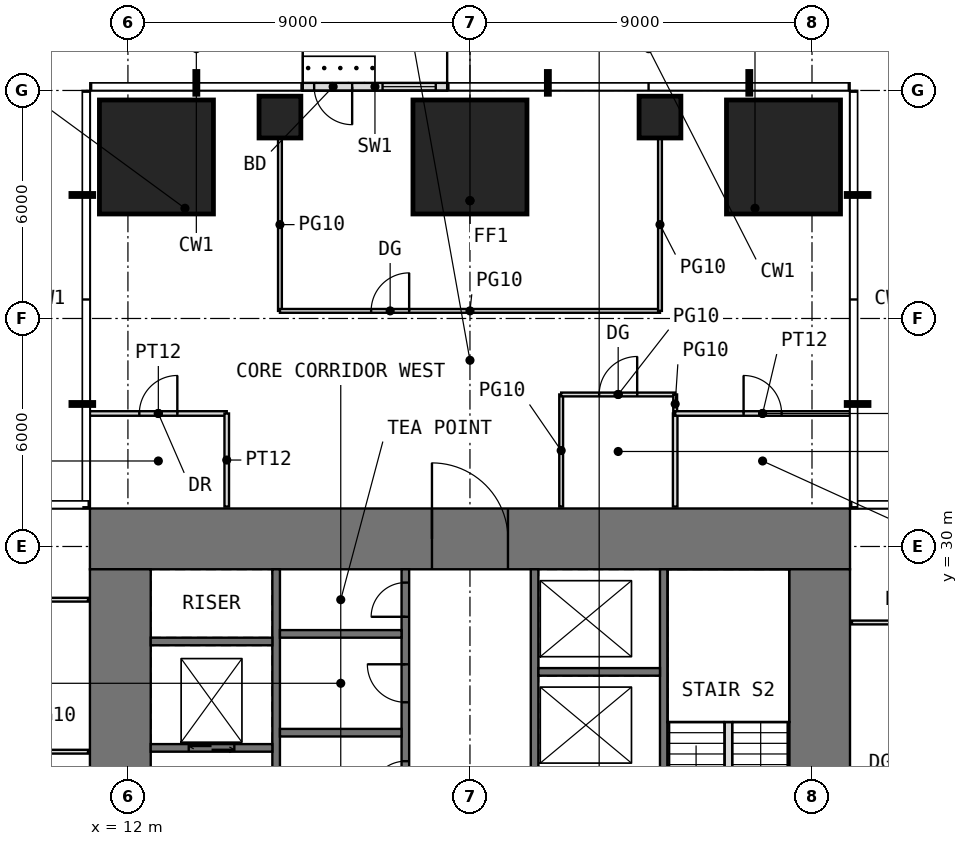
"""IFC4 building model, lengths in metres.
Left out: names, types, materials, properties, quantities, classifications, styles, units other than length and angle.
Written with IfcOpenShell. Run it as: python <this file> out.ifc"""

import sys

from ifc_helpers import new_model, si_unit, direction, frame, frame_2d, origin, origin_2d, place, context, subcontext, project, spatial, rectangle, extrude, element, fill, save


model = new_model("IFC4")
c1 = context("Model", 3, precision=1e-05, world=origin(), true_north=direction((0.0, 1.0)))
c2 = subcontext(c1, "Body", "Model", "MODEL_VIEW")
j1 = project(units=[si_unit("LENGTHUNIT", "METRE"), si_unit("PLANEANGLEUNIT", "RADIAN")], contexts=[c1])
p1 = place(None, origin())
s1 = spatial("IfcSite", under=j1, at=p1, CompositionType="ELEMENT")
p2 = place(p1, origin())
s2 = spatial("IfcBuilding", under=s1, at=p2, CompositionType="ELEMENT")
p3 = place(p2, frame((0.0, 0.0, 140.5)))
s3 = spatial("IfcBuildingStorey", under=s2, at=p3, CompositionType="ELEMENT", Elevation=140.5)
p4 = place(p3, frame((12.75, 40.25, 0.0), z_axis=(0.0, 0.0, 1.0), x_axis=(1.0, 0.0, 0.0)))
e1 = element("IfcColumn", 1, at=p4, inside=s3, PredefinedType="COLUMN", context=c2, shape_type="SweptSolid", body=[
    extrude(rectangle(XDim=3.0, YDim=3.0, at=origin_2d()), origin(), (0.0, 0.0, 1.0), 4.0),
])
p5 = place(p3, frame((16.0, 41.3, 0.0), z_axis=(0.0, 0.0, 1.0), x_axis=(1.0, 0.0, 0.0)))
e2 = element("IfcColumn", 2, at=p5, inside=s3, PredefinedType="COLUMN", context=c2, shape_type="SweptSolid", body=[
    extrude(rectangle(XDim=1.1, YDim=1.1, at=origin_2d()), origin(), (0.0, 0.0, 1.0), 4.0),
])
p6 = place(p3, frame((21.0, 40.25, 0.0), z_axis=(0.0, 0.0, 1.0), x_axis=(1.0, 0.0, 0.0)))
e3 = element("IfcColumn", 3, at=p6, inside=s3, PredefinedType="COLUMN", context=c2, shape_type="SweptSolid", body=[
    extrude(rectangle(XDim=3.0, YDim=3.0, at=origin_2d()), origin(), (0.0, 0.0, 1.0), 4.0),
])
p7 = place(p3, frame((26.0, 41.3, 0.0), z_axis=(0.0, 0.0, 1.0), x_axis=(1.0, 0.0, 0.0)))
e4 = element("IfcColumn", 4, at=p7, inside=s3, PredefinedType="COLUMN", context=c2, shape_type="SweptSolid", body=[
    extrude(rectangle(XDim=1.1, YDim=1.1, at=origin_2d()), origin(), (0.0, 0.0, 1.0), 4.0),
])
p8 = place(p3, frame((29.25, 40.25, 0.0), z_axis=(0.0, 0.0, 1.0), x_axis=(1.0, 0.0, 0.0)))
e5 = element("IfcColumn", 5, at=p8, inside=s3, PredefinedType="COLUMN", context=c2, shape_type="SweptSolid", body=[
    extrude(rectangle(XDim=3.0, YDim=3.0, at=origin_2d()), origin(), (0.0, 0.0, 1.0), 4.0),
])
p9 = place(p3, frame((20.4, 42.1, 0.0), z_axis=(0.0, 0.0, 1.0), x_axis=(-1.0, 0.0, 0.0)))
e6 = element("IfcWall", 6, at=p9, inside=s3, PredefinedType="USERDEFINED", context=c2, shape_type="SweptSolid", body=[
    extrude(rectangle(XDim=3.8, YDim=0.2, at=frame_2d((1.9, 0.0))), origin(), (0.0, 0.0, 1.0), 3.75),
])
p10 = place(p9, frame((2.5, 0.0, 0.0)))
e7 = element("IfcOpeningElement", 7, at=p10, cuts=e6, PredefinedType="OPENING", context=c2, shape_type="SweptSolid", body=[
    extrude(rectangle(XDim=1.0, YDim=2.4, at=frame_2d((0.5, 1.2))), frame((0.0, 0.11, 0.0), z_axis=(0.0, -1.0, 0.0), x_axis=(1.0, 0.0, 0.0)), (0.0, 0.0, 1.0), 0.22),
])
p11 = place(p9, frame((0.3, 0.0, 0.3)))
e8 = element("IfcOpeningElement", 8, at=p11, cuts=e6, PredefinedType="OPENING", context=c2, shape_type="SweptSolid", body=[
    extrude(rectangle(XDim=1.4, YDim=2.7, at=frame_2d((0.7, 1.35))), frame((0.0, 0.11, 0.0), z_axis=(0.0, -1.0, 0.0), x_axis=(1.0, 0.0, 0.0)), (0.0, 0.0, 1.0), 0.22),
])
p12 = place(p3, frame((11.0, 30.2, -0.05), z_axis=(0.0, 0.0, 1.0), x_axis=(1.0, 0.0, 0.0)))
e9 = element("IfcWall", 9, at=p12, inside=s3, PredefinedType="SHEAR", context=c2, shape_type="SweptSolid", body=[
    extrude(rectangle(XDim=20.0, YDim=1.6, at=frame_2d((10.0, 0.0))), origin(), (0.0, 0.0, 1.0), 4.0),
])
p13 = place(p12, frame((9.0, 0.0, 0.05)))
e10 = element("IfcOpeningElement", 10, at=p13, cuts=e9, PredefinedType="OPENING", context=c2, shape_type="SweptSolid", body=[
    extrude(rectangle(XDim=2.0, YDim=2.2, at=frame_2d((1.0, 1.1))), frame((0.0, 0.81, 0.0), z_axis=(0.0, -1.0, 0.0), x_axis=(1.0, 0.0, 0.0)), (0.0, 0.0, 1.0), 1.62),
])
p14 = place(p3, frame((11.8, 12.6, -0.05), z_axis=(0.0, 0.0, 1.0), x_axis=(0.0, 1.0, 0.0)))
e11 = element("IfcWall", 11, at=p14, inside=s3, PredefinedType="SHEAR", context=c2, shape_type="SweptSolid", body=[
    extrude(rectangle(XDim=16.8, YDim=1.6, at=frame_2d((8.4, 0.0))), origin(), (0.0, 0.0, 1.0), 4.0),
])
p15 = place(p14, frame((9.9, 0.0, 0.05)))
e12 = element("IfcOpeningElement", 12, at=p15, cuts=e11, PredefinedType="OPENING", context=c2, shape_type="SweptSolid", body=[
    extrude(rectangle(XDim=1.0, YDim=2.2, at=frame_2d((0.5, 1.1))), frame((0.0, 0.81, 0.0), z_axis=(0.0, -1.0, 0.0), x_axis=(1.0, 0.0, 0.0)), (0.0, 0.0, 1.0), 1.62),
])
p16 = place(p3, frame((30.2, 12.6, -0.05), z_axis=(0.0, 0.0, 1.0), x_axis=(0.0, 1.0, 0.0)))
e13 = element("IfcWall", 13, at=p16, inside=s3, PredefinedType="SHEAR", context=c2, shape_type="SweptSolid", body=[
    extrude(rectangle(XDim=16.8, YDim=1.6, at=frame_2d((8.4, 0.0))), origin(), (0.0, 0.0, 1.0), 4.0),
])
p17 = place(p16, frame((5.9, 0.0, 0.05)))
e14 = element("IfcOpeningElement", 14, at=p17, cuts=e13, PredefinedType="OPENING", context=c2, shape_type="SweptSolid", body=[
    extrude(rectangle(XDim=1.0, YDim=2.2, at=frame_2d((0.5, 1.1))), frame((0.0, 0.81, 0.0), z_axis=(0.0, -1.0, 0.0), x_axis=(1.0, 0.0, 0.0)), (0.0, 0.0, 1.0), 1.62),
])
p18 = place(p3, frame((15.9, 12.6, -0.05), z_axis=(0.0, 0.0, 1.0), x_axis=(0.0, 1.0, 0.0)))
e15 = element("IfcWall", 15, at=p18, inside=s3, PredefinedType="SHEAR", context=c2, shape_type="SweptSolid", body=[
    extrude(rectangle(XDim=16.8, YDim=0.2, at=frame_2d((8.4, 0.0))), origin(), (0.0, 0.0, 1.0), 4.0),
])
p19 = place(p18, frame((8.9, 0.0, 0.05)))
e16 = element("IfcOpeningElement", 16, at=p19, cuts=e15, PredefinedType="OPENING", context=c2, shape_type="SweptSolid", body=[
    extrude(rectangle(XDim=1.0, YDim=2.2, at=frame_2d((0.5, 1.1))), frame((0.0, 0.11, 0.0), z_axis=(0.0, -1.0, 0.0), x_axis=(1.0, 0.0, 0.0)), (0.0, 0.0, 1.0), 0.22),
])
p20 = place(p3, frame((19.3, 12.6, -0.05), z_axis=(0.0, 0.0, 1.0), x_axis=(0.0, 1.0, 0.0)))
e17 = element("IfcWall", 17, at=p20, inside=s3, PredefinedType="SHEAR", context=c2, shape_type="SweptSolid", body=[
    extrude(rectangle(XDim=16.8, YDim=0.2, at=frame_2d((8.4, 0.0))), origin(), (0.0, 0.0, 1.0), 4.0),
])
p21 = place(p20, frame((8.7, 0.0, 0.05)))
e18 = element("IfcOpeningElement", 18, at=p21, cuts=e17, PredefinedType="OPENING", context=c2, shape_type="SweptSolid", body=[
    extrude(rectangle(XDim=1.0, YDim=2.2, at=frame_2d((0.5, 1.1))), frame((0.0, 0.11, 0.0), z_axis=(0.0, -1.0, 0.0), x_axis=(1.0, 0.0, 0.0)), (0.0, 0.0, 1.0), 0.22),
])
p22 = place(p20, frame((10.85, 0.0, 0.05)))
e19 = element("IfcOpeningElement", 19, at=p22, cuts=e17, PredefinedType="OPENING", context=c2, shape_type="SweptSolid", body=[
    extrude(rectangle(XDim=0.9, YDim=2.2, at=frame_2d((0.45, 1.1))), frame((0.0, 0.11, 0.0), z_axis=(0.0, -1.0, 0.0), x_axis=(1.0, 0.0, 0.0)), (0.0, 0.0, 1.0), 0.22),
])
p23 = place(p20, frame((13.3, 0.0, 0.05)))
e20 = element("IfcOpeningElement", 20, at=p23, cuts=e17, PredefinedType="OPENING", context=c2, shape_type="SweptSolid", body=[
    extrude(rectangle(XDim=1.0, YDim=2.2, at=frame_2d((0.5, 1.1))), frame((0.0, 0.11, 0.0), z_axis=(0.0, -1.0, 0.0), x_axis=(1.0, 0.0, 0.0)), (0.0, 0.0, 1.0), 0.22),
])
p24 = place(p20, frame((15.55, 0.0, 0.05)))
e21 = element("IfcOpeningElement", 21, at=p24, cuts=e17, PredefinedType="OPENING", context=c2, shape_type="SweptSolid", body=[
    extrude(rectangle(XDim=0.9, YDim=2.2, at=frame_2d((0.45, 1.1))), frame((0.0, 0.11, 0.0), z_axis=(0.0, -1.0, 0.0), x_axis=(1.0, 0.0, 0.0)), (0.0, 0.0, 1.0), 0.22),
])
p25 = place(p20, frame((0.75, 0.0, 0.05)))
e22 = element("IfcOpeningElement", 22, at=p25, cuts=e17, PredefinedType="OPENING", context=c2, shape_type="SweptSolid", body=[
    extrude(rectangle(XDim=1.1, YDim=2.2, at=frame_2d((0.55, 1.1))), frame((0.0, 0.11, 0.0), z_axis=(0.0, -1.0, 0.0), x_axis=(1.0, 0.0, 0.0)), (0.0, 0.0, 1.0), 0.22),
])
p26 = place(p20, frame((3.55, 0.0, 0.05)))
e23 = element("IfcOpeningElement", 23, at=p26, cuts=e17, PredefinedType="OPENING", context=c2, shape_type="SweptSolid", body=[
    extrude(rectangle(XDim=1.1, YDim=2.2, at=frame_2d((0.55, 1.1))), frame((0.0, 0.11, 0.0), z_axis=(0.0, -1.0, 0.0), x_axis=(1.0, 0.0, 0.0)), (0.0, 0.0, 1.0), 0.22),
])
p27 = place(p20, frame((6.35, 0.0, 0.05)))
e24 = element("IfcOpeningElement", 24, at=p27, cuts=e17, PredefinedType="OPENING", context=c2, shape_type="SweptSolid", body=[
    extrude(rectangle(XDim=1.1, YDim=2.2, at=frame_2d((0.55, 1.1))), frame((0.0, 0.11, 0.0), z_axis=(0.0, -1.0, 0.0), x_axis=(1.0, 0.0, 0.0)), (0.0, 0.0, 1.0), 0.22),
])
p28 = place(p3, frame((22.7, 12.6, -0.05), z_axis=(0.0, 0.0, 1.0), x_axis=(0.0, 1.0, 0.0)))
e25 = element("IfcWall", 25, at=p28, inside=s3, PredefinedType="SHEAR", context=c2, shape_type="SweptSolid", body=[
    extrude(rectangle(XDim=16.8, YDim=0.2, at=frame_2d((8.4, 0.0))), origin(), (0.0, 0.0, 1.0), 4.0),
])
p29 = place(p28, frame((7.1, 0.0, 0.05)))
e26 = element("IfcOpeningElement", 26, at=p29, cuts=e25, PredefinedType="OPENING", context=c2, shape_type="SweptSolid", body=[
    extrude(rectangle(XDim=1.0, YDim=2.2, at=frame_2d((0.5, 1.1))), frame((0.0, 0.11, 0.0), z_axis=(0.0, -1.0, 0.0), x_axis=(1.0, 0.0, 0.0)), (0.0, 0.0, 1.0), 0.22),
])
p30 = place(p28, frame((1.55, 0.0, 0.05)))
e27 = element("IfcOpeningElement", 27, at=p30, cuts=e25, PredefinedType="OPENING", context=c2, shape_type="SweptSolid", body=[
    extrude(rectangle(XDim=0.9, YDim=2.2, at=frame_2d((0.45, 1.1))), frame((0.0, 0.11, 0.0), z_axis=(0.0, -1.0, 0.0), x_axis=(1.0, 0.0, 0.0)), (0.0, 0.0, 1.0), 0.22),
])
p31 = place(p28, frame((4.95, 0.0, 0.05)))
e28 = element("IfcOpeningElement", 28, at=p31, cuts=e25, PredefinedType="OPENING", context=c2, shape_type="SweptSolid", body=[
    extrude(rectangle(XDim=0.9, YDim=2.2, at=frame_2d((0.45, 1.1))), frame((0.0, 0.11, 0.0), z_axis=(0.0, -1.0, 0.0), x_axis=(1.0, 0.0, 0.0)), (0.0, 0.0, 1.0), 0.22),
])
p32 = place(p28, frame((9.4, 0.0, 0.05)))
e29 = element("IfcOpeningElement", 29, at=p32, cuts=e25, PredefinedType="OPENING", context=c2, shape_type="SweptSolid", body=[
    extrude(rectangle(XDim=1.0, YDim=2.2, at=frame_2d((0.5, 1.1))), frame((0.0, 0.11, 0.0), z_axis=(0.0, -1.0, 0.0), x_axis=(1.0, 0.0, 0.0)), (0.0, 0.0, 1.0), 0.22),
])
p33 = place(p3, frame((26.1, 12.6, -0.05), z_axis=(0.0, 0.0, 1.0), x_axis=(0.0, 1.0, 0.0)))
e30 = element("IfcWall", 30, at=p33, inside=s3, PredefinedType="SHEAR", context=c2, shape_type="SweptSolid", body=[
    extrude(rectangle(XDim=16.8, YDim=0.2, at=frame_2d((8.4, 0.0))), origin(), (0.0, 0.0, 1.0), 4.0),
])
p34 = place(p33, frame((6.9, 0.0, 0.05)))
e31 = element("IfcOpeningElement", 31, at=p34, cuts=e30, PredefinedType="OPENING", context=c2, shape_type="SweptSolid", body=[
    extrude(rectangle(XDim=1.0, YDim=2.2, at=frame_2d((0.5, 1.1))), frame((0.0, 0.11, 0.0), z_axis=(0.0, -1.0, 0.0), x_axis=(1.0, 0.0, 0.0)), (0.0, 0.0, 1.0), 0.22),
])
p35 = place(p3, frame((12.6, 24.7, -0.05), z_axis=(0.0, 0.0, 1.0), x_axis=(1.0, 0.0, 0.0)))
e32 = element("IfcWall", 32, at=p35, inside=s3, PredefinedType="SHEAR", context=c2, shape_type="SweptSolid", body=[
    extrude(rectangle(XDim=3.2, YDim=0.2, at=frame_2d((1.6, 0.0))), origin(), (0.0, 0.0, 1.0), 4.0),
])
p36 = place(p35, frame((1.0, 0.0, 0.05)))
e33 = element("IfcOpeningElement", 33, at=p36, cuts=e32, PredefinedType="OPENING", context=c2, shape_type="SweptSolid", body=[
    extrude(rectangle(XDim=1.2, YDim=2.2, at=frame_2d((0.6, 1.1))), frame((0.0, 0.11, 0.0), z_axis=(0.0, -1.0, 0.0), x_axis=(1.0, 0.0, 0.0)), (0.0, 0.0, 1.0), 0.22),
])
for number, where, z_axis, x_axis in (
    (34, (12.6, 27.5, -0.05), (0.0, 0.0, 1.0), (1.0, 0.0, 0.0)),
    (35, (16.0, 25.1, -0.05), (0.0, 0.0, 1.0), (1.0, 0.0, 0.0)),
    (36, (16.0, 27.7, -0.05), (0.0, 0.0, 1.0), (1.0, 0.0, 0.0)),
    (37, (22.8, 26.7, -0.05), (0.0, 0.0, 1.0), (1.0, 0.0, 0.0)),
):
    element("IfcWall", number, at=place(p3, frame(where, z_axis=z_axis, x_axis=x_axis)), inside=s3, PredefinedType="SHEAR", context=c2, shape_type="SweptSolid", body=[
        extrude(rectangle(XDim=3.2, YDim=0.2, at=frame_2d((1.6, 0.0))), origin(), (0.0, 0.0, 1.0), 4.0),
    ])
for number, where, z_axis, x_axis in (
    (38, (8.0, 24.6, 0.0), (0.0, 0.0, 1.0), (1.0, 0.0, 0.0)),
    (39, (8.0, 28.6, 0.0), (0.0, 0.0, 1.0), (1.0, 0.0, 0.0)),
):
    element("IfcWall", number, at=place(p3, frame(where, z_axis=z_axis, x_axis=x_axis)), inside=s3, PredefinedType="PARTITIONING", context=c2, shape_type="SweptSolid", body=[
        extrude(rectangle(XDim=2.95, YDim=0.1, at=frame_2d((1.475, 0.0))), origin(), (0.0, 0.0, 1.0), 3.75),
    ])
p37 = place(p3, frame((11.0, 33.5, 0.0), z_axis=(0.0, 0.0, 1.0), x_axis=(1.0, 0.0, 0.0)))
e40 = element("IfcWall", 40, at=p37, inside=s3, PredefinedType="PARTITIONING", context=c2, shape_type="SweptSolid", body=[
    extrude(rectangle(XDim=3.6, YDim=0.12, at=frame_2d((1.8, 0.0))), origin(), (0.0, 0.0, 1.0), 3.75),
])
p38 = place(p37, frame((1.3, 0.0, 0.0)))
e41 = element("IfcOpeningElement", 41, at=p38, cuts=e40, PredefinedType="OPENING", context=c2, shape_type="SweptSolid", body=[
    extrude(rectangle(XDim=1.0, YDim=2.2, at=frame_2d((0.5, 1.1))), frame((0.0, 0.07, 0.0), z_axis=(0.0, -1.0, 0.0), x_axis=(1.0, 0.0, 0.0)), (0.0, 0.0, 1.0), 0.14),
])
p39 = place(p3, frame((14.6, 31.05, 0.0), z_axis=(0.0, 0.0, 1.0), x_axis=(0.0, 1.0, 0.0)))
e42 = element("IfcWall", 42, at=p39, inside=s3, PredefinedType="PARTITIONING", context=c2, shape_type="SweptSolid", body=[
    extrude(rectangle(XDim=2.45, YDim=0.12, at=frame_2d((1.225, 0.0))), origin(), (0.0, 0.0, 1.0), 3.75),
])
p40 = place(p3, frame((16.0, 36.2, 0.0), z_axis=(0.0, 0.0, 1.0), x_axis=(0.0, 1.0, 0.0)))
e43 = element("IfcWall", 43, at=p40, inside=s3, PredefinedType="PARTITIONING", context=c2, shape_type="SweptSolid", body=[
    extrude(rectangle(XDim=4.54, YDim=0.1, at=frame_2d((2.27, 0.0))), origin(), (0.0, 0.0, 1.0), 3.75),
])
p41 = place(p3, frame((16.0, 36.2, 0.0), z_axis=(0.0, 0.0, 1.0), x_axis=(1.0, 0.0, 0.0)))
e44 = element("IfcWall", 44, at=p41, inside=s3, PredefinedType="PARTITIONING", context=c2, shape_type="SweptSolid", body=[
    extrude(rectangle(XDim=10.0, YDim=0.1, at=frame_2d((5.0, 0.0))), origin(), (0.0, 0.0, 1.0), 3.75),
])
p42 = place(p41, frame((2.4, 0.0, 0.0)))
e45 = element("IfcOpeningElement", 45, at=p42, cuts=e44, PredefinedType="OPENING", context=c2, shape_type="SweptSolid", body=[
    extrude(rectangle(XDim=1.0, YDim=2.4, at=frame_2d((0.5, 1.2))), frame((0.0, 0.06, 0.0), z_axis=(0.0, -1.0, 0.0), x_axis=(1.0, 0.0, 0.0)), (0.0, 0.0, 1.0), 0.12),
])
p43 = place(p3, frame((23.4, 31.05, 0.0), z_axis=(0.0, 0.0, 1.0), x_axis=(0.0, 1.0, 0.0)))
e46 = element("IfcWall", 46, at=p43, inside=s3, PredefinedType="PARTITIONING", context=c2, shape_type="SweptSolid", body=[
    extrude(rectangle(XDim=2.95, YDim=0.1, at=frame_2d((1.475, 0.0))), origin(), (0.0, 0.0, 1.0), 3.75),
])
p44 = place(p3, frame((23.4, 34.0, 0.0), z_axis=(0.0, 0.0, 1.0), x_axis=(1.0, 0.0, 0.0)))
e47 = element("IfcWall", 47, at=p44, inside=s3, PredefinedType="PARTITIONING", context=c2, shape_type="SweptSolid", body=[
    extrude(rectangle(XDim=3.0, YDim=0.1, at=frame_2d((1.5, 0.0))), origin(), (0.0, 0.0, 1.0), 3.75),
])
p45 = place(p44, frame((1.0, 0.0, 0.0)))
e48 = element("IfcOpeningElement", 48, at=p45, cuts=e47, PredefinedType="OPENING", context=c2, shape_type="SweptSolid", body=[
    extrude(rectangle(XDim=1.0, YDim=2.4, at=frame_2d((0.5, 1.2))), frame((0.0, 0.06, 0.0), z_axis=(0.0, -1.0, 0.0), x_axis=(1.0, 0.0, 0.0)), (0.0, 0.0, 1.0), 0.12),
])
p46 = place(p3, frame((26.0, 36.2, 0.0), z_axis=(0.0, 0.0, 1.0), x_axis=(0.0, 1.0, 0.0)))
e49 = element("IfcWall", 49, at=p46, inside=s3, PredefinedType="PARTITIONING", context=c2, shape_type="SweptSolid", body=[
    extrude(rectangle(XDim=4.54, YDim=0.1, at=frame_2d((2.27, 0.0))), origin(), (0.0, 0.0, 1.0), 3.75),
])
p47 = place(p3, frame((26.4, 31.05, 0.0), z_axis=(0.0, 0.0, 1.0), x_axis=(0.0, 1.0, 0.0)))
e50 = element("IfcWall", 50, at=p47, inside=s3, PredefinedType="PARTITIONING", context=c2, shape_type="SweptSolid", body=[
    extrude(rectangle(XDim=2.45, YDim=0.12, at=frame_2d((1.225, 0.0))), origin(), (0.0, 0.0, 1.0), 3.75),
])
p48 = place(p3, frame((26.4, 33.5, 0.0), z_axis=(0.0, 0.0, 1.0), x_axis=(0.0, 1.0, 0.0)))
e51 = element("IfcWall", 51, at=p48, inside=s3, PredefinedType="PARTITIONING", context=c2, shape_type="SweptSolid", body=[
    extrude(rectangle(XDim=0.5, YDim=0.1, at=frame_2d((0.25, 0.0))), origin(), (0.0, 0.0, 1.0), 3.75),
])
p49 = place(p3, frame((26.4, 33.5, 0.0), z_axis=(0.0, 0.0, 1.0), x_axis=(1.0, 0.0, 0.0)))
e52 = element("IfcWall", 52, at=p49, inside=s3, PredefinedType="PARTITIONING", context=c2, shape_type="SweptSolid", body=[
    extrude(rectangle(XDim=4.6, YDim=0.12, at=frame_2d((2.3, 0.0))), origin(), (0.0, 0.0, 1.0), 3.75),
])
p50 = place(p49, frame((1.8, 0.0, 0.0)))
e53 = element("IfcOpeningElement", 53, at=p50, cuts=e52, PredefinedType="OPENING", context=c2, shape_type="SweptSolid", body=[
    extrude(rectangle(XDim=1.0, YDim=2.2, at=frame_2d((0.5, 1.1))), frame((0.0, 0.07, 0.0), z_axis=(0.0, -1.0, 0.0), x_axis=(1.0, 0.0, 0.0)), (0.0, 0.0, 1.0), 0.14),
])
p51 = place(p3, frame((31.05, 28.0, 0.0), z_axis=(0.0, 0.0, 1.0), x_axis=(1.0, 0.0, 0.0)))
e54 = element("IfcWall", 54, at=p51, inside=s3, PredefinedType="PARTITIONING", context=c2, shape_type="SweptSolid", body=[
    extrude(rectangle(XDim=2.95, YDim=0.1, at=frame_2d((1.475, 0.0))), origin(), (0.0, 0.0, 1.0), 3.75),
])
p52 = place(p3, frame((27.8, 22.3, 0.0), z_axis=(0.0, 0.0, 1.0), x_axis=(0.0, 1.0, 0.0)))
e55 = element("IfcWall", 55, at=p52, inside=s3, PredefinedType="PARTITIONING", context=c2, shape_type="SweptSolid", body=[
    extrude(rectangle(XDim=3.08, YDim=0.2, at=frame_2d((1.54, 0.0))), origin(), (0.0, 0.0, 1.0), 4.0),
])
p53 = place(p10, origin())
e56 = element("IfcDoor", 56, at=p53, inside=s3, OperationType="SINGLE_SWING_LEFT", PredefinedType="DOOR", context=c2, shape_type="SweptSolid", body=[
    extrude(rectangle(XDim=1.0, YDim=2.4, at=frame_2d((0.5, 1.2))), frame((0.0, 0.025, 0.0), z_axis=(0.0, -1.0, 0.0), x_axis=(1.0, 0.0, 0.0)), (0.0, 0.0, 1.0), 0.05),
])
fill(e7, e56)
p54 = place(p11, origin())
e57 = element("IfcWindow", 57, at=p54, inside=s3, PartitioningType="SINGLE_PANEL", PredefinedType="WINDOW", context=c2, shape_type="SweptSolid", body=[
    extrude(rectangle(XDim=1.4, YDim=2.7, at=frame_2d((0.7, 1.35))), frame((0.0, 0.03, 0.0), z_axis=(0.0, -1.0, 0.0), x_axis=(1.0, 0.0, 0.0)), (0.0, 0.0, 1.0), 0.06),
])
fill(e8, e57)
p55 = place(p13, origin())
e58 = element("IfcDoor", 58, at=p55, inside=s3, OperationType="DOUBLE_DOOR_SINGLE_SWING", PredefinedType="DOOR", context=c2, shape_type="SweptSolid", body=[
    extrude(rectangle(XDim=2.0, YDim=2.2, at=frame_2d((1.0, 1.1))), frame((0.0, 0.025, 0.0), z_axis=(0.0, -1.0, 0.0), x_axis=(1.0, 0.0, 0.0)), (0.0, 0.0, 1.0), 0.05),
])
fill(e10, e58)
p56 = place(p22, origin())
e59 = element("IfcDoor", 59, at=p56, inside=s3, OperationType="SINGLE_SWING_LEFT", PredefinedType="DOOR", context=c2, shape_type="SweptSolid", body=[
    extrude(rectangle(XDim=0.9, YDim=2.2, at=frame_2d((0.45, 1.1))), frame((0.0, 0.025, 0.0), z_axis=(0.0, -1.0, 0.0), x_axis=(1.0, 0.0, 0.0)), (0.0, 0.0, 1.0), 0.05),
])
fill(e19, e59)
p57 = place(p23, origin())
e60 = element("IfcDoor", 60, at=p57, inside=s3, OperationType="SINGLE_SWING_RIGHT", PredefinedType="DOOR", context=c2, shape_type="SweptSolid", body=[
    extrude(rectangle(XDim=1.0, YDim=2.2, at=frame_2d((0.5, 1.1))), frame((0.0, 0.025, 0.0), z_axis=(0.0, -1.0, 0.0), x_axis=(1.0, 0.0, 0.0)), (0.0, 0.0, 1.0), 0.05),
])
fill(e20, e60)
p58 = place(p24, origin())
e61 = element("IfcDoor", 61, at=p58, inside=s3, OperationType="SINGLE_SWING_LEFT", PredefinedType="DOOR", context=c2, shape_type="SweptSolid", body=[
    extrude(rectangle(XDim=0.9, YDim=2.2, at=frame_2d((0.45, 1.1))), frame((0.0, 0.025, 0.0), z_axis=(0.0, -1.0, 0.0), x_axis=(1.0, 0.0, 0.0)), (0.0, 0.0, 1.0), 0.05),
])
fill(e21, e61)
p59 = place(p38, origin())
e62 = element("IfcDoor", 62, at=p59, inside=s3, OperationType="SINGLE_SWING_RIGHT", PredefinedType="DOOR", context=c2, shape_type="SweptSolid", body=[
    extrude(rectangle(XDim=1.0, YDim=2.2, at=frame_2d((0.5, 1.1))), frame((0.0, 0.025, 0.0), z_axis=(0.0, -1.0, 0.0), x_axis=(1.0, 0.0, 0.0)), (0.0, 0.0, 1.0), 0.05),
])
fill(e41, e62)
p60 = place(p45, origin())
e63 = element("IfcDoor", 63, at=p60, inside=s3, OperationType="SINGLE_SWING_RIGHT", PredefinedType="DOOR", context=c2, shape_type="SweptSolid", body=[
    extrude(rectangle(XDim=1.0, YDim=2.4, at=frame_2d((0.5, 1.2))), frame((0.0, 0.025, 0.0), z_axis=(0.0, -1.0, 0.0), x_axis=(1.0, 0.0, 0.0)), (0.0, 0.0, 1.0), 0.05),
])
fill(e48, e63)
p61 = place(p50, origin())
e64 = element("IfcDoor", 64, at=p61, inside=s3, OperationType="SINGLE_SWING_LEFT", PredefinedType="DOOR", context=c2, shape_type="SweptSolid", body=[
    extrude(rectangle(XDim=1.0, YDim=2.2, at=frame_2d((0.5, 1.1))), frame((0.0, 0.025, 0.0), z_axis=(0.0, -1.0, 0.0), x_axis=(1.0, 0.0, 0.0)), (0.0, 0.0, 1.0), 0.05),
])
fill(e53, e64)
p62 = place(p42, origin())
e65 = element("IfcDoor", 65, at=p62, inside=s3, OperationType="SINGLE_SWING_RIGHT", PredefinedType="DOOR", context=c2, shape_type="SweptSolid", body=[
    extrude(rectangle(XDim=1.0, YDim=2.4, at=frame_2d((0.5, 1.2))), frame((0.0, 0.025, 0.0), z_axis=(0.0, -1.0, 0.0), x_axis=(1.0, 0.0, 0.0)), (0.0, 0.0, 1.0), 0.05),
])
fill(e45, e65)
p63 = place(p36, origin())
e66 = element("IfcDoor", 66, at=p63, inside=s3, OperationType="DOUBLE_DOOR_SLIDING", PredefinedType="DOOR", context=c2, shape_type="SweptSolid", body=[
    extrude(rectangle(XDim=1.2, YDim=2.2, at=frame_2d((0.6, 1.1))), frame((0.0, 0.025, 0.0), z_axis=(0.0, -1.0, 0.0), x_axis=(1.0, 0.0, 0.0)), (0.0, 0.0, 1.0), 0.05),
])
fill(e33, e66)
save(model, sys.argv[1])
